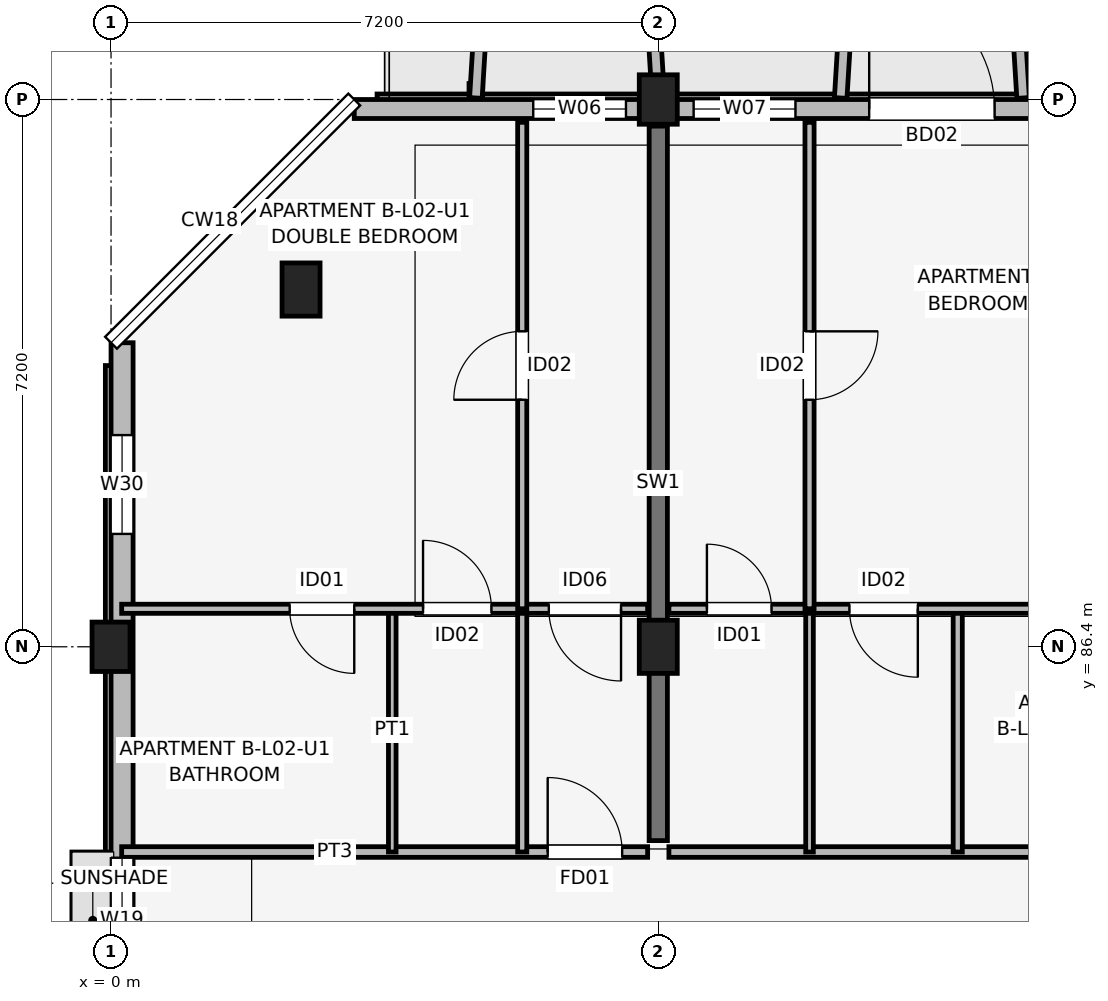
"""IFC4 building model, lengths in metres.
Left out: names, types, materials, properties, quantities, classifications, styles, units other than length and angle.
Written with IfcOpenShell. Run it as: python <this file> out.ifc"""

import sys

from ifc_helpers import new_model, si_unit, direction, frame, frame_2d, origin, origin_2d, place, context, subcontext, project, spatial, rectangle, extrude, element, fill, save


model = new_model("IFC4")
c1 = context("Model", 3, precision=1e-05, world=origin(), true_north=direction((0.0, 1.0)))
c2 = subcontext(c1, "Body", "Model", "MODEL_VIEW")
j1 = project(units=[si_unit("LENGTHUNIT", "METRE"), si_unit("PLANEANGLEUNIT", "RADIAN")], contexts=[c1])
p1 = place(None, origin())
s1 = spatial("IfcSite", under=j1, at=p1, CompositionType="ELEMENT")
p2 = place(p1, origin())
s2 = spatial("IfcBuilding", under=s1, at=p2, CompositionType="ELEMENT")
p3 = place(p2, frame((0.0, 0.0, 8.7)))
s3 = spatial("IfcBuildingStorey", under=s2, at=p3, CompositionType="ELEMENT", Elevation=8.7)
p4 = place(p3, frame((0.0, 86.4, 0.0), z_axis=(0.0, 0.0, 1.0), x_axis=(1.0, 0.0, 0.0)))
e1 = element("IfcColumn", 1, at=p4, inside=s3, PredefinedType="COLUMN", context=c2, shape_type="SweptSolid", body=[
    extrude(rectangle(XDim=0.5, YDim=0.65, at=origin_2d()), origin(), (0.0, 0.0, 1.0), 3.15),
])
for number, where, z_axis, x_axis in (
    (2, (2.5, 91.1, 0.0), (0.0, 0.0, 1.0), (1.0, 0.0, 0.0)),
    (3, (7.2, 86.4, 0.0), (0.0, 0.0, 1.0), (1.0, 0.0, 0.0)),
):
    element("IfcColumn", number, at=place(p3, frame(where, z_axis=z_axis, x_axis=x_axis)), inside=s3, PredefinedType="COLUMN", context=c2, shape_type="SweptSolid", body=[
        extrude(rectangle(XDim=0.5, YDim=0.7, at=origin_2d()), origin(), (0.0, 0.0, 1.0), 3.15),
    ])
p5 = place(p3, frame((7.2, 93.6, 0.0), z_axis=(0.0, 0.0, 1.0), x_axis=(1.0, 0.0, 0.0)))
e4 = element("IfcColumn", 4, at=p5, inside=s3, PredefinedType="COLUMN", context=c2, shape_type="SweptSolid", body=[
    extrude(rectangle(XDim=0.5, YDim=0.65, at=origin_2d()), origin(), (0.0, 0.0, 1.0), 3.15),
])
p6 = place(p3, frame((7.2, 83.85, 0.0), z_axis=(0.0, 0.0, 1.0), x_axis=(0.0, 1.0, 0.0)))
e5 = element("IfcWall", 5, at=p6, inside=s3, PredefinedType="SHEAR", context=c2, shape_type="SweptSolid", body=[
    extrude(rectangle(XDim=9.4, YDim=0.24, at=frame_2d((4.7, 0.0))), origin(), (0.0, 0.0, 1.0), 3.15),
])
p7 = place(p3, frame((32.8, 93.475, 0.0), z_axis=(0.0, 0.0, 1.0), x_axis=(-1.0, 0.0, 0.0)))
e6 = element("IfcWall", 6, at=p7, inside=s3, PredefinedType="SOLIDWALL", context=c2, shape_type="SweptSolid", body=[
    extrude(rectangle(XDim=29.6, YDim=0.25, at=frame_2d((14.8, 0.0))), origin(), (0.0, 0.0, 1.0), 2.43),
])
p8 = place(p7, frame((22.825, 0.0, 0.0), z_axis=(0.0, 0.0, 1.0), x_axis=(-1.0, 0.0, 0.0)))
e7 = element("IfcOpeningElement", 7, at=p8, cuts=e6, PredefinedType="OPENING", context=c2, shape_type="SweptSolid", body=[
    extrude(rectangle(XDim=1.65, YDim=2.15, at=frame_2d((0.825, 1.075))), frame((0.0, 0.135, 0.0), z_axis=(0.0, -1.0, 0.0), x_axis=(1.0, 0.0, 0.0)), (0.0, 0.0, 1.0), 0.27),
])
p9 = place(p7, frame((8.35, 0.0, 0.0), z_axis=(0.0, 0.0, 1.0), x_axis=(-1.0, 0.0, 0.0)))
e8 = element("IfcOpeningElement", 8, at=p9, cuts=e6, PredefinedType="OPENING", context=c2, shape_type="SweptSolid", body=[
    extrude(rectangle(XDim=1.5, YDim=2.15, at=frame_2d((0.75, 1.075))), frame((0.0, 0.135, 0.0), z_axis=(0.0, -1.0, 0.0), x_axis=(1.0, 0.0, 0.0)), (0.0, 0.0, 1.0), 0.27),
])
p10 = place(p7, frame((26.025, 0.0, 0.75)))
e9 = element("IfcOpeningElement", 9, at=p10, cuts=e6, PredefinedType="OPENING", context=c2, shape_type="SweptSolid", body=[
    extrude(rectangle(XDim=1.22, YDim=1.5, at=frame_2d((0.61, 0.75))), frame((0.0, 0.135, 0.0), z_axis=(0.0, -1.0, 0.0), x_axis=(1.0, 0.0, 0.0)), (0.0, 0.0, 1.0), 0.27),
])
p11 = place(p7, frame((23.795, 0.0, 0.75)))
e10 = element("IfcOpeningElement", 10, at=p11, cuts=e6, PredefinedType="OPENING", context=c2, shape_type="SweptSolid", body=[
    extrude(rectangle(XDim=1.34, YDim=1.55, at=frame_2d((0.67, 0.775))), frame((0.0, 0.135, 0.0), z_axis=(0.0, -1.0, 0.0), x_axis=(1.0, 0.0, 0.0)), (0.0, 0.0, 1.0), 0.27),
])
p12 = place(p7, frame((16.265, 0.0, 0.7)))
e11 = element("IfcOpeningElement", 11, at=p12, cuts=e6, PredefinedType="OPENING", context=c2, shape_type="SweptSolid", body=[
    extrude(rectangle(XDim=1.58, YDim=1.6, at=frame_2d((0.79, 0.8))), frame((0.0, 0.135, 0.0), z_axis=(0.0, -1.0, 0.0), x_axis=(1.0, 0.0, 0.0)), (0.0, 0.0, 1.0), 0.27),
])
p13 = place(p7, frame((12.245, 0.0, 0.75)))
e12 = element("IfcOpeningElement", 12, at=p13, cuts=e6, PredefinedType="OPENING", context=c2, shape_type="SweptSolid", body=[
    extrude(rectangle(XDim=0.6, YDim=1.25, at=frame_2d((0.3, 0.625))), frame((0.0, 0.135, 0.0), z_axis=(0.0, -1.0, 0.0), x_axis=(1.0, 0.0, 0.0)), (0.0, 0.0, 1.0), 0.27),
])
p14 = place(p7, frame((9.705, 0.0, 0.75)))
e13 = element("IfcOpeningElement", 13, at=p14, cuts=e6, PredefinedType="OPENING", context=c2, shape_type="SweptSolid", body=[
    extrude(rectangle(XDim=0.72, YDim=1.35, at=frame_2d((0.36, 0.675))), frame((0.0, 0.135, 0.0), z_axis=(0.0, -1.0, 0.0), x_axis=(1.0, 0.0, 0.0)), (0.0, 0.0, 1.0), 0.27),
])
p15 = place(p7, frame((2.44, 0.0, 0.75)))
e14 = element("IfcOpeningElement", 14, at=p15, cuts=e6, PredefinedType="OPENING", context=c2, shape_type="SweptSolid", body=[
    extrude(rectangle(XDim=0.85, YDim=1.4, at=frame_2d((0.425, 0.7))), frame((0.0, 0.135, 0.0), z_axis=(0.0, -1.0, 0.0), x_axis=(1.0, 0.0, 0.0)), (0.0, 0.0, 1.0), 0.27),
])
p16 = place(p3, frame((0.145, 90.4, 0.0), z_axis=(0.0, 0.0, 1.0), x_axis=(0.0, -1.0, 0.0)))
e15 = element("IfcWall", 15, at=p16, inside=s3, PredefinedType="SOLIDWALL", context=c2, shape_type="SweptSolid", body=[
    extrude(rectangle(XDim=15.2, YDim=0.29, at=frame_2d((7.6, 0.0))), origin(), (0.0, 0.0, 1.0), 2.38),
])
p17 = place(p16, frame((6.775, 0.0, 1.05)))
e16 = element("IfcOpeningElement", 16, at=p17, cuts=e15, PredefinedType="OPENING", context=c2, shape_type="SweptSolid", body=[
    extrude(rectangle(XDim=1.65, YDim=1.15, at=frame_2d((0.825, 0.575))), frame((0.0, 0.155, 0.0), z_axis=(0.0, -1.0, 0.0), x_axis=(1.0, 0.0, 0.0)), (0.0, 0.0, 1.0), 0.31),
])
p18 = place(p16, frame((1.215, 0.0, 0.72)))
e17 = element("IfcOpeningElement", 17, at=p18, cuts=e15, PredefinedType="OPENING", context=c2, shape_type="SweptSolid", body=[
    extrude(rectangle(XDim=1.3, YDim=1.55, at=frame_2d((0.65, 0.775))), frame((0.0, 0.155, 0.0), z_axis=(0.0, -1.0, 0.0), x_axis=(1.0, 0.0, 0.0)), (0.0, 0.0, 1.0), 0.31),
])
for number, where, z_axis, x_axis in (
    (18, (4.8, 93.62, 0.0), (0.0, 0.0, 1.0), (0.061, 0.998, 0.0)),
    (19, (7.2, 93.62, 0.0), (0.0, 0.0, 1.0), (-0.061, 0.998, 0.0)),
):
    element("IfcWall", number, at=place(p3, frame(where, z_axis=z_axis, x_axis=x_axis)), inside=s3, PredefinedType="ELEMENTEDWALL", context=c2, shape_type="SweptSolid", body=[
        extrude(rectangle(XDim=1.964, YDim=0.165, at=frame_2d((0.982, 0.0))), origin(), (0.0, 0.0, 1.0), 2.95),
    ])
for number, where, z_axis, x_axis in (
    (20, (9.6, 93.62, 0.0), (0.0, 0.0, 1.0), (0.061, 0.998, 0.0)),
    (21, (12.0, 93.62, 0.0), (0.0, 0.0, 1.0), (-0.061, 0.998, 0.0)),
):
    element("IfcWall", number, at=place(p3, frame(where, z_axis=z_axis, x_axis=x_axis)), inside=s3, PredefinedType="ELEMENTEDWALL", context=c2, shape_type="SweptSolid", body=[
        extrude(rectangle(XDim=1.964, YDim=0.165, at=frame_2d((0.982, 0.0))), origin(), (0.0, 0.0, 1.0), 2.55),
    ])
p19 = place(p3, frame((0.14, 83.7, 0.0), z_axis=(0.0, 0.0, 1.0), x_axis=(1.0, 0.0, 0.0)))
e22 = element("IfcWall", 22, at=p19, inside=s3, PredefinedType="PARTITIONING", context=c2, shape_type="SweptSolid", body=[
    extrude(rectangle(XDim=6.92, YDim=0.14, at=frame_2d((3.46, 0.0))), origin(), (0.0, 0.0, 1.0), 2.38),
])
p20 = place(p19, frame((5.605, 0.0, 0.0)))
e23 = element("IfcOpeningElement", 23, at=p20, cuts=e22, PredefinedType="OPENING", context=c2, shape_type="SweptSolid", body=[
    extrude(rectangle(XDim=0.98, YDim=2.1, at=frame_2d((0.49, 1.05))), frame((0.0, 0.08, 0.0), z_axis=(0.0, -1.0, 0.0), x_axis=(1.0, 0.0, 0.0)), (0.0, 0.0, 1.0), 0.16),
])
p21 = place(p3, frame((3.7, 83.7, 0.0), z_axis=(0.0, 0.0, 1.0), x_axis=(0.0, 1.0, 0.0)))
e24 = element("IfcWall", 24, at=p21, inside=s3, PredefinedType="PARTITIONING", context=c2, shape_type="SweptSolid", body=[
    extrude(rectangle(XDim=3.2, YDim=0.1, at=frame_2d((1.6, 0.0))), origin(), (0.0, 0.0, 1.0), 2.375),
])
p22 = place(p3, frame((5.41, 83.7, 0.0), z_axis=(0.0, 0.0, 1.0), x_axis=(0.0, 1.0, 0.0)))
e25 = element("IfcWall", 25, at=p22, inside=s3, PredefinedType="PARTITIONING", context=c2, shape_type="SweptSolid", body=[
    extrude(rectangle(XDim=3.2, YDim=0.12, at=frame_2d((1.6, 0.0))), origin(), (0.0, 0.0, 1.0), 2.375),
])
p23 = place(p3, frame((0.14, 86.9, 0.0), z_axis=(0.0, 0.0, 1.0), x_axis=(1.0, 0.0, 0.0)))
e26 = element("IfcWall", 26, at=p23, inside=s3, PredefinedType="PARTITIONING", context=c2, shape_type="SweptSolid", body=[
    extrude(rectangle(XDim=6.92, YDim=0.12, at=frame_2d((3.46, 0.0))), origin(), (0.0, 0.0, 1.0), 2.38),
])
p24 = place(p23, frame((3.06, 0.0, 0.0), z_axis=(0.0, 0.0, 1.0), x_axis=(-1.0, 0.0, 0.0)))
e27 = element("IfcOpeningElement", 27, at=p24, cuts=e26, PredefinedType="OPENING", context=c2, shape_type="SweptSolid", body=[
    extrude(rectangle(XDim=0.85, YDim=2.08, at=frame_2d((0.425, 1.04))), frame((0.0, 0.07, 0.0), z_axis=(0.0, -1.0, 0.0), x_axis=(1.0, 0.0, 0.0)), (0.0, 0.0, 1.0), 0.14),
])
p25 = place(p23, frame((3.965, 0.0, 0.0)))
e28 = element("IfcOpeningElement", 28, at=p25, cuts=e26, PredefinedType="OPENING", context=c2, shape_type="SweptSolid", body=[
    extrude(rectangle(XDim=0.9, YDim=2.08, at=frame_2d((0.45, 1.04))), frame((0.0, 0.07, 0.0), z_axis=(0.0, -1.0, 0.0), x_axis=(1.0, 0.0, 0.0)), (0.0, 0.0, 1.0), 0.14),
])
p26 = place(p23, frame((6.57, 0.0, 0.0), z_axis=(0.0, 0.0, 1.0), x_axis=(-1.0, 0.0, 0.0)))
e29 = element("IfcOpeningElement", 29, at=p26, cuts=e26, PredefinedType="OPENING", context=c2, shape_type="SweptSolid", body=[
    extrude(rectangle(XDim=0.95, YDim=2.08, at=frame_2d((0.475, 1.04))), frame((0.0, 0.07, 0.0), z_axis=(0.0, -1.0, 0.0), x_axis=(1.0, 0.0, 0.0)), (0.0, 0.0, 1.0), 0.14),
])
p27 = place(p3, frame((5.41, 86.9, 0.0), z_axis=(0.0, 0.0, 1.0), x_axis=(0.0, 1.0, 0.0)))
e30 = element("IfcWall", 30, at=p27, inside=s3, PredefinedType="PARTITIONING", context=c2, shape_type="SweptSolid", body=[
    extrude(rectangle(XDim=6.4, YDim=0.12, at=frame_2d((3.2, 0.0))), origin(), (0.0, 0.0, 1.0), 2.38),
])
p28 = place(p27, frame((2.75, 0.0, 0.0)))
e31 = element("IfcOpeningElement", 31, at=p28, cuts=e30, PredefinedType="OPENING", context=c2, shape_type="SweptSolid", body=[
    extrude(rectangle(XDim=0.9, YDim=2.08, at=frame_2d((0.45, 1.04))), frame((0.0, 0.07, 0.0), z_axis=(0.0, -1.0, 0.0), x_axis=(1.0, 0.0, 0.0)), (0.0, 0.0, 1.0), 0.14),
])
p29 = place(p3, frame((7.34, 83.7, 0.0), z_axis=(0.0, 0.0, 1.0), x_axis=(1.0, 0.0, 0.0)))
e32 = element("IfcWall", 32, at=p29, inside=s3, PredefinedType="PARTITIONING", context=c2, shape_type="SweptSolid", body=[
    extrude(rectangle(XDim=6.92, YDim=0.14, at=frame_2d((3.46, 0.0))), origin(), (0.0, 0.0, 1.0), 2.38),
])
p30 = place(p29, frame((5.85, 0.0, 0.0), z_axis=(0.0, 0.0, 1.0), x_axis=(-1.0, 0.0, 0.0)))
e33 = element("IfcOpeningElement", 33, at=p30, cuts=e32, PredefinedType="OPENING", context=c2, shape_type="SweptSolid", body=[
    extrude(rectangle(XDim=0.98, YDim=2.1, at=frame_2d((0.49, 1.05))), frame((0.0, 0.08, 0.0), z_axis=(0.0, -1.0, 0.0), x_axis=(1.0, 0.0, 0.0)), (0.0, 0.0, 1.0), 0.16),
])
p31 = place(p3, frame((9.19, 83.7, 0.0), z_axis=(0.0, 0.0, 1.0), x_axis=(0.0, 1.0, 0.0)))
e34 = element("IfcWall", 34, at=p31, inside=s3, PredefinedType="PARTITIONING", context=c2, shape_type="SweptSolid", body=[
    extrude(rectangle(XDim=3.2, YDim=0.1, at=frame_2d((1.6, 0.0))), origin(), (0.0, 0.0, 1.0), 2.375),
])
p32 = place(p3, frame((11.14, 83.7, 0.0), z_axis=(0.0, 0.0, 1.0), x_axis=(0.0, 1.0, 0.0)))
e35 = element("IfcWall", 35, at=p32, inside=s3, PredefinedType="PARTITIONING", context=c2, shape_type="SweptSolid", body=[
    extrude(rectangle(XDim=3.2, YDim=0.12, at=frame_2d((1.6, 0.0))), origin(), (0.0, 0.0, 1.0), 2.375),
])
p33 = place(p3, frame((7.34, 86.9, 0.0), z_axis=(0.0, 0.0, 1.0), x_axis=(1.0, 0.0, 0.0)))
e36 = element("IfcWall", 36, at=p33, inside=s3, PredefinedType="PARTITIONING", context=c2, shape_type="SweptSolid", body=[
    extrude(rectangle(XDim=6.92, YDim=0.12, at=frame_2d((3.46, 0.0))), origin(), (0.0, 0.0, 1.0), 2.38),
])
p34 = place(p33, frame((0.5, 0.0, 0.0)))
e37 = element("IfcOpeningElement", 37, at=p34, cuts=e36, PredefinedType="OPENING", context=c2, shape_type="SweptSolid", body=[
    extrude(rectangle(XDim=0.85, YDim=2.08, at=frame_2d((0.425, 1.04))), frame((0.0, 0.07, 0.0), z_axis=(0.0, -1.0, 0.0), x_axis=(1.0, 0.0, 0.0)), (0.0, 0.0, 1.0), 0.14),
])
p35 = place(p33, frame((3.275, 0.0, 0.0), z_axis=(0.0, 0.0, 1.0), x_axis=(-1.0, 0.0, 0.0)))
e38 = element("IfcOpeningElement", 38, at=p35, cuts=e36, PredefinedType="OPENING", context=c2, shape_type="SweptSolid", body=[
    extrude(rectangle(XDim=0.9, YDim=2.08, at=frame_2d((0.45, 1.04))), frame((0.0, 0.07, 0.0), z_axis=(0.0, -1.0, 0.0), x_axis=(1.0, 0.0, 0.0)), (0.0, 0.0, 1.0), 0.14),
])
p36 = place(p33, frame((4.885, 0.0, 0.0)))
e39 = element("IfcOpeningElement", 39, at=p36, cuts=e36, PredefinedType="OPENING", context=c2, shape_type="SweptSolid", body=[
    extrude(rectangle(XDim=0.95, YDim=2.08, at=frame_2d((0.475, 1.04))), frame((0.0, 0.07, 0.0), z_axis=(0.0, -1.0, 0.0), x_axis=(1.0, 0.0, 0.0)), (0.0, 0.0, 1.0), 0.14),
])
p37 = place(p3, frame((9.19, 86.9, 0.0), z_axis=(0.0, 0.0, 1.0), x_axis=(0.0, 1.0, 0.0)))
e40 = element("IfcWall", 40, at=p37, inside=s3, PredefinedType="PARTITIONING", context=c2, shape_type="SweptSolid", body=[
    extrude(rectangle(XDim=6.4, YDim=0.12, at=frame_2d((3.2, 0.0))), origin(), (0.0, 0.0, 1.0), 2.38),
])
p38 = place(p37, frame((3.65, 0.0, 0.0), z_axis=(0.0, 0.0, 1.0), x_axis=(-1.0, 0.0, 0.0)))
e41 = element("IfcOpeningElement", 41, at=p38, cuts=e40, PredefinedType="OPENING", context=c2, shape_type="SweptSolid", body=[
    extrude(rectangle(XDim=0.9, YDim=2.08, at=frame_2d((0.45, 1.04))), frame((0.0, 0.07, 0.0), z_axis=(0.0, -1.0, 0.0), x_axis=(1.0, 0.0, 0.0)), (0.0, 0.0, 1.0), 0.14),
])
p39 = place(p8, origin())
e42 = element("IfcDoor", 42, at=p39, inside=s3, OperationType="SINGLE_SWING_RIGHT", PredefinedType="DOOR", context=c2, shape_type="SweptSolid", body=[
    extrude(rectangle(XDim=1.65, YDim=2.15, at=frame_2d((0.825, 1.075))), frame((0.0, 0.025, 0.0), z_axis=(0.0, -1.0, 0.0), x_axis=(1.0, 0.0, 0.0)), (0.0, 0.0, 1.0), 0.05),
])
fill(e7, e42)
p40 = place(p10, origin())
e43 = element("IfcWindow", 43, at=p40, inside=s3, PartitioningType="SINGLE_PANEL", PredefinedType="WINDOW", context=c2, shape_type="SweptSolid", body=[
    extrude(rectangle(XDim=1.22, YDim=1.5, at=frame_2d((0.61, 0.75))), frame((0.0, 0.03, 0.0), z_axis=(0.0, -1.0, 0.0), x_axis=(1.0, 0.0, 0.0)), (0.0, 0.0, 1.0), 0.06),
])
fill(e9, e43)
p41 = place(p11, origin())
e44 = element("IfcWindow", 44, at=p41, inside=s3, PartitioningType="SINGLE_PANEL", PredefinedType="WINDOW", context=c2, shape_type="SweptSolid", body=[
    extrude(rectangle(XDim=1.34, YDim=1.55, at=frame_2d((0.67, 0.775))), frame((0.0, 0.03, 0.0), z_axis=(0.0, -1.0, 0.0), x_axis=(1.0, 0.0, 0.0)), (0.0, 0.0, 1.0), 0.06),
])
fill(e10, e44)
p42 = place(p17, origin())
e45 = element("IfcWindow", 45, at=p42, inside=s3, PartitioningType="SINGLE_PANEL", PredefinedType="WINDOW", context=c2, shape_type="SweptSolid", body=[
    extrude(rectangle(XDim=1.65, YDim=1.15, at=frame_2d((0.825, 0.575))), frame((0.0, 0.03, 0.0), z_axis=(0.0, -1.0, 0.0), x_axis=(1.0, 0.0, 0.0)), (0.0, 0.0, 1.0), 0.06),
])
fill(e16, e45)
p43 = place(p18, origin())
e46 = element("IfcWindow", 46, at=p43, inside=s3, PartitioningType="SINGLE_PANEL", PredefinedType="WINDOW", context=c2, shape_type="SweptSolid", body=[
    extrude(rectangle(XDim=1.3, YDim=1.55, at=frame_2d((0.65, 0.775))), frame((0.0, 0.03, 0.0), z_axis=(0.0, -1.0, 0.0), x_axis=(1.0, 0.0, 0.0)), (0.0, 0.0, 1.0), 0.06),
])
fill(e17, e46)
p44 = place(p20, origin())
e47 = element("IfcDoor", 47, at=p44, inside=s3, OperationType="SINGLE_SWING_LEFT", PredefinedType="DOOR", context=c2, shape_type="SweptSolid", body=[
    extrude(rectangle(XDim=0.98, YDim=2.1, at=frame_2d((0.49, 1.05))), frame((0.0, 0.025, 0.0), z_axis=(0.0, -1.0, 0.0), x_axis=(1.0, 0.0, 0.0)), (0.0, 0.0, 1.0), 0.05),
])
fill(e23, e47)
p45 = place(p24, origin())
e48 = element("IfcDoor", 48, at=p45, inside=s3, OperationType="SINGLE_SWING_RIGHT", PredefinedType="DOOR", context=c2, shape_type="SweptSolid", body=[
    extrude(rectangle(XDim=0.85, YDim=2.08, at=frame_2d((0.425, 1.04))), frame((0.0, 0.025, 0.0), z_axis=(0.0, -1.0, 0.0), x_axis=(1.0, 0.0, 0.0)), (0.0, 0.0, 1.0), 0.05),
])
fill(e27, e48)
p46 = place(p25, origin())
e49 = element("IfcDoor", 49, at=p46, inside=s3, OperationType="SINGLE_SWING_LEFT", PredefinedType="DOOR", context=c2, shape_type="SweptSolid", body=[
    extrude(rectangle(XDim=0.9, YDim=2.08, at=frame_2d((0.45, 1.04))), frame((0.0, 0.025, 0.0), z_axis=(0.0, -1.0, 0.0), x_axis=(1.0, 0.0, 0.0)), (0.0, 0.0, 1.0), 0.05),
])
fill(e28, e49)
p47 = place(p26, origin())
e50 = element("IfcDoor", 50, at=p47, inside=s3, OperationType="SINGLE_SWING_RIGHT", PredefinedType="DOOR", context=c2, shape_type="SweptSolid", body=[
    extrude(rectangle(XDim=0.95, YDim=2.08, at=frame_2d((0.475, 1.04))), frame((0.0, 0.025, 0.0), z_axis=(0.0, -1.0, 0.0), x_axis=(1.0, 0.0, 0.0)), (0.0, 0.0, 1.0), 0.05),
])
fill(e29, e50)
p48 = place(p28, origin())
e51 = element("IfcDoor", 51, at=p48, inside=s3, OperationType="SINGLE_SWING_LEFT", PredefinedType="DOOR", context=c2, shape_type="SweptSolid", body=[
    extrude(rectangle(XDim=0.9, YDim=2.08, at=frame_2d((0.45, 1.04))), frame((0.0, 0.025, 0.0), z_axis=(0.0, -1.0, 0.0), x_axis=(1.0, 0.0, 0.0)), (0.0, 0.0, 1.0), 0.05),
])
fill(e31, e51)
p49 = place(p34, origin())
e52 = element("IfcDoor", 52, at=p49, inside=s3, OperationType="SINGLE_SWING_LEFT", PredefinedType="DOOR", context=c2, shape_type="SweptSolid", body=[
    extrude(rectangle(XDim=0.85, YDim=2.08, at=frame_2d((0.425, 1.04))), frame((0.0, 0.025, 0.0), z_axis=(0.0, -1.0, 0.0), x_axis=(1.0, 0.0, 0.0)), (0.0, 0.0, 1.0), 0.05),
])
fill(e37, e52)
p50 = place(p35, origin())
e53 = element("IfcDoor", 53, at=p50, inside=s3, OperationType="SINGLE_SWING_RIGHT", PredefinedType="DOOR", context=c2, shape_type="SweptSolid", body=[
    extrude(rectangle(XDim=0.9, YDim=2.08, at=frame_2d((0.45, 1.04))), frame((0.0, 0.025, 0.0), z_axis=(0.0, -1.0, 0.0), x_axis=(1.0, 0.0, 0.0)), (0.0, 0.0, 1.0), 0.05),
])
fill(e38, e53)
p51 = place(p38, origin())
e54 = element("IfcDoor", 54, at=p51, inside=s3, OperationType="SINGLE_SWING_RIGHT", PredefinedType="DOOR", context=c2, shape_type="SweptSolid", body=[
    extrude(rectangle(XDim=0.9, YDim=2.08, at=frame_2d((0.45, 1.04))), frame((0.0, 0.025, 0.0), z_axis=(0.0, -1.0, 0.0), x_axis=(1.0, 0.0, 0.0)), (0.0, 0.0, 1.0), 0.05),
])
fill(e41, e54)
save(model, sys.argv[1])
